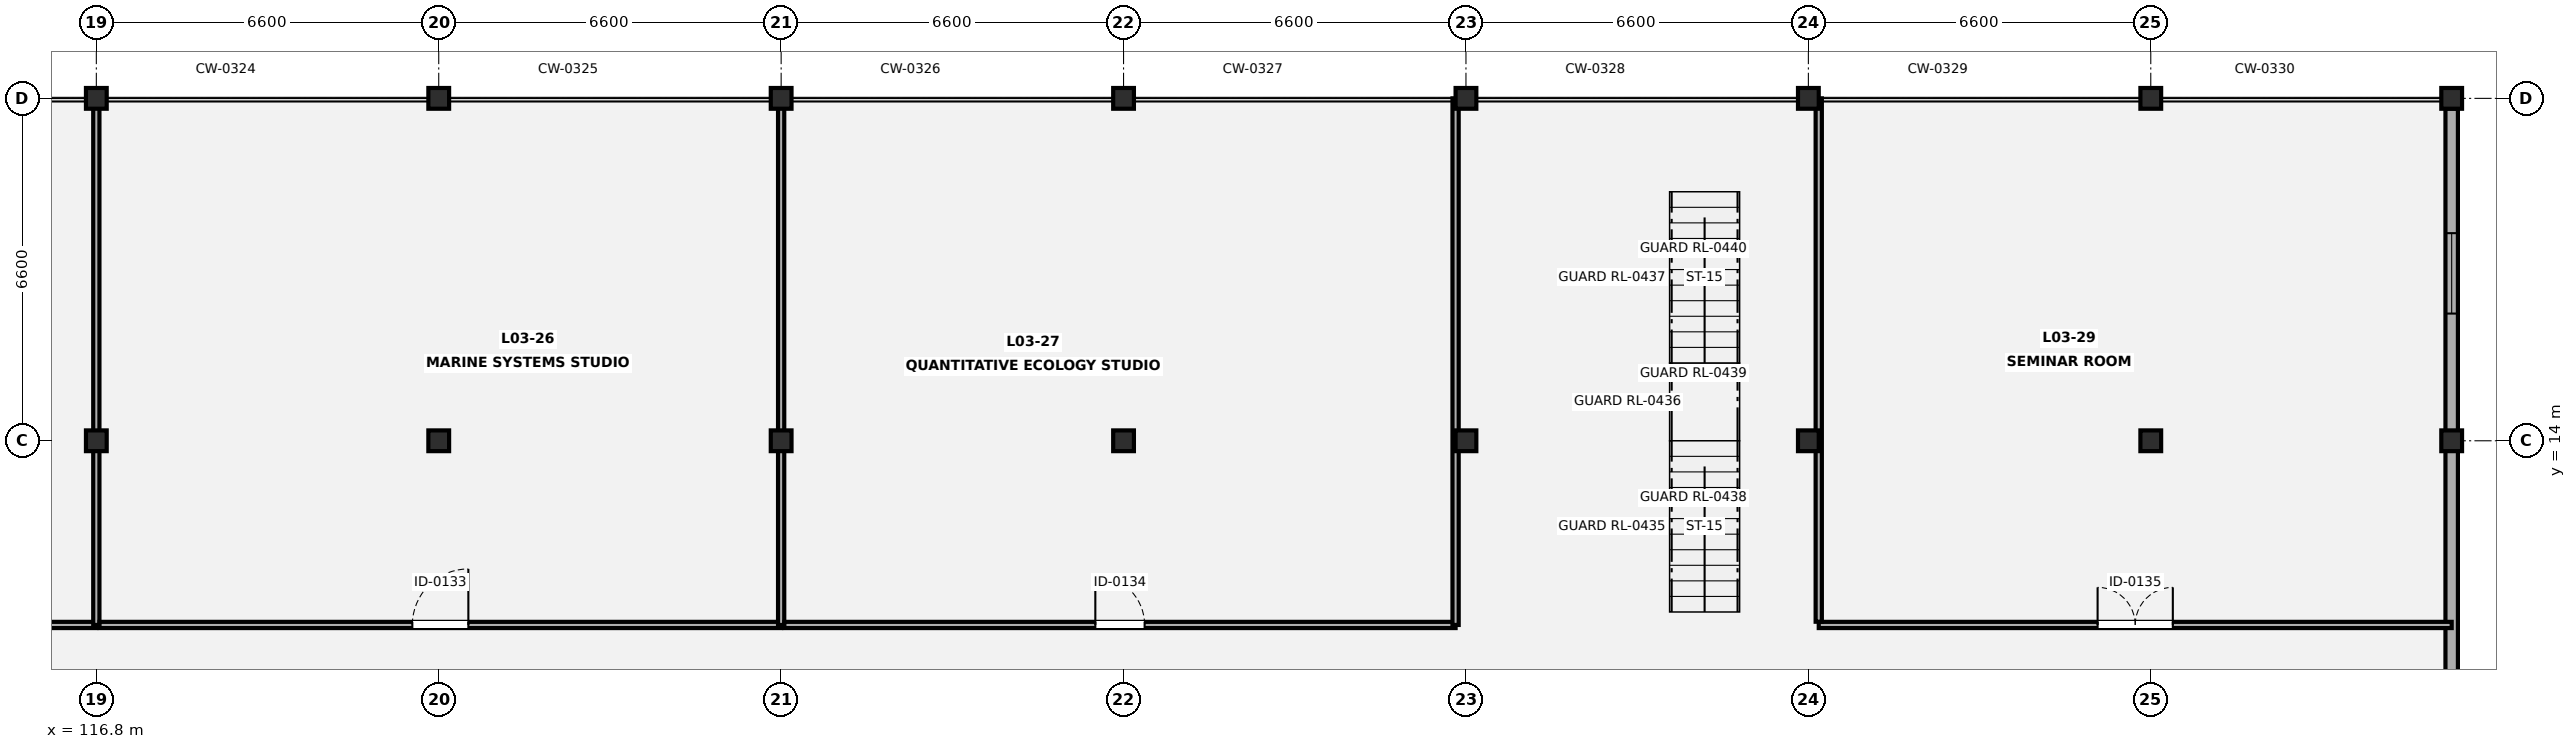
"""IFC4 building model, lengths in metres.
Left out: names, types, materials, properties, quantities, classifications, styles, units other than length and angle.
Written with IfcOpenShell. Run it as: python <this file> out.ifc"""

import sys

from ifc_helpers import new_model, si_unit, direction, frame, frame_2d, origin, origin_2d, place, context, subcontext, project, spatial, rectangle, i_section, extrude, element, fill, save


model = new_model("IFC4")
c1 = context("Model", 3, precision=1e-05, world=origin(), true_north=direction((0.0, 1.0)))
c2 = subcontext(c1, "Body", "Model", "MODEL_VIEW")
j1 = project(units=[si_unit("LENGTHUNIT", "METRE"), si_unit("PLANEANGLEUNIT", "RADIAN")], contexts=[c1])
p1 = place(None, origin())
s1 = spatial("IfcSite", under=j1, at=p1, CompositionType="ELEMENT")
p2 = place(p1, origin())
s2 = spatial("IfcBuilding", under=s1, at=p2, CompositionType="ELEMENT")
p3 = place(p2, frame((0.0, 0.0, 13.3)))
s3 = spatial("IfcBuildingStorey", under=s2, at=p3, CompositionType="ELEMENT", Elevation=13.3)
for number, where, z_axis, x_axis in (
    (1, (116.8, 14.0, 0.0), (0.0, 0.0, 1.0), (1.0, 0.0, 0.0)),
    (2, (116.8, 20.6, 0.0), (0.0, 0.0, 1.0), (1.0, 0.0, 0.0)),
    (3, (123.4, 14.0, 0.0), (0.0, 0.0, 1.0), (1.0, 0.0, 0.0)),
    (4, (123.4, 20.6, 0.0), (0.0, 0.0, 1.0), (1.0, 0.0, 0.0)),
    (5, (130.0, 14.0, 0.0), (0.0, 0.0, 1.0), (1.0, 0.0, 0.0)),
    (6, (130.0, 20.6, 0.0), (0.0, 0.0, 1.0), (1.0, 0.0, 0.0)),
    (7, (136.6, 14.0, 0.0), (0.0, 0.0, 1.0), (1.0, 0.0, 0.0)),
    (8, (136.6, 20.6, 0.0), (0.0, 0.0, 1.0), (1.0, 0.0, 0.0)),
    (9, (143.2, 14.0, 0.0), (0.0, 0.0, 1.0), (1.0, 0.0, 0.0)),
    (10, (143.2, 20.6, 0.0), (0.0, 0.0, 1.0), (1.0, 0.0, 0.0)),
    (11, (149.8, 14.0, 0.0), (0.0, 0.0, 1.0), (1.0, 0.0, 0.0)),
    (12, (149.8, 20.6, 0.0), (0.0, 0.0, 1.0), (1.0, 0.0, 0.0)),
    (13, (156.4, 14.0, 0.0), (0.0, 0.0, 1.0), (1.0, 0.0, 0.0)),
    (14, (156.4, 20.6, 0.0), (0.0, 0.0, 1.0), (1.0, 0.0, 0.0)),
    (15, (162.2, 14.0, 0.0), (0.0, 0.0, 1.0), (1.0, 0.0, 0.0)),
    (16, (162.2, 20.6, 0.0), (0.0, 0.0, 1.0), (1.0, 0.0, 0.0)),
):
    element("IfcColumn", number, at=place(p3, frame(where, z_axis=z_axis, x_axis=x_axis)), inside=s3, PredefinedType="COLUMN", context=c2, shape_type="SweptSolid", body=[
        extrude(i_section(OverallWidth=0.4, OverallDepth=0.4, WebThickness=0.02, FlangeThickness=0.035, FilletRadius=0.016, at=origin_2d()), origin(), (0.0, 0.0, 1.0), 4.2),
    ])
p4 = place(p3, frame((162.2, 20.402, 0.0), z_axis=(0.0, 0.0, 1.0), x_axis=(0.0, -1.0, 0.0)))
e17 = element("IfcWall", 17, at=p4, inside=s3, PredefinedType="SOLIDWALL", context=c2, shape_type="SweptSolid", body=[
    extrude(rectangle(XDim=19.404, YDim=0.24, at=frame_2d((9.702, 0.0))), origin(), (0.0, 0.0, 1.0), 3.372),
])
p5 = place(p4, frame((2.4, 0.0, 0.85)))
e18 = element("IfcOpeningElement", 18, at=p5, cuts=e17, PredefinedType="OPENING", context=c2, shape_type="SweptSolid", body=[
    extrude(rectangle(XDim=1.55, YDim=1.4, at=frame_2d((0.775, 0.7))), frame((0.0, 0.13, 0.0), z_axis=(0.0, -1.0, 0.0), x_axis=(1.0, 0.0, 0.0)), (0.0, 0.0, 1.0), 0.26),
])
p6 = place(p4, frame((15.1, 0.0, 0.85)))
e19 = element("IfcOpeningElement", 19, at=p6, cuts=e17, PredefinedType="OPENING", context=c2, shape_type="SweptSolid", body=[
    extrude(rectangle(XDim=1.95, YDim=1.5, at=frame_2d((0.975, 0.75))), frame((0.0, 0.13, 0.0), z_axis=(0.0, -1.0, 0.0), x_axis=(1.0, 0.0, 0.0)), (0.0, 0.0, 1.0), 0.26),
])
p7 = place(p3, frame((103.6, 10.45, 0.0), z_axis=(0.0, 0.0, 1.0), x_axis=(1.0, 0.0, 0.0)))
e20 = element("IfcWall", 20, at=p7, inside=s3, PredefinedType="PARTITIONING", context=c2, shape_type="SweptSolid", body=[
    extrude(rectangle(XDim=13.2, YDim=0.12, at=frame_2d((6.6, 0.0))), origin(), (0.0, 0.0, 1.0), 3.546),
])
p8 = place(p7, frame((6.125, 0.0, 0.0)))
e21 = element("IfcOpeningElement", 21, at=p8, cuts=e20, PredefinedType="OPENING", context=c2, shape_type="SweptSolid", body=[
    extrude(rectangle(XDim=0.95, YDim=2.1, at=frame_2d((0.475, 1.05))), frame((0.0, 0.07, 0.0), z_axis=(0.0, -1.0, 0.0), x_axis=(1.0, 0.0, 0.0)), (0.0, 0.0, 1.0), 0.14),
])
p9 = place(p3, frame((116.8, 10.45, 0.0), z_axis=(0.0, 0.0, 1.0), x_axis=(0.0, 1.0, 0.0)))
e22 = element("IfcWall", 22, at=p9, inside=s3, PredefinedType="PARTITIONING", context=c2, shape_type="SweptSolid", body=[
    extrude(rectangle(XDim=10.15, YDim=0.12, at=frame_2d((5.075, 0.0))), origin(), (0.0, 0.0, 1.0), 3.372),
])
p10 = place(p3, frame((116.862, 10.45, 0.0), z_axis=(0.0, 0.0, 1.0), x_axis=(1.0, 0.0, 0.0)))
e23 = element("IfcWall", 23, at=p10, inside=s3, PredefinedType="PARTITIONING", context=c2, shape_type="SweptSolid", body=[
    extrude(rectangle(XDim=13.138, YDim=0.12, at=frame_2d((6.569, 0.0))), origin(), (0.0, 0.0, 1.0), 3.546),
])
p11 = place(p10, frame((6.029, 0.0, 0.0)))
e24 = element("IfcOpeningElement", 24, at=p11, cuts=e23, PredefinedType="OPENING", context=c2, shape_type="SweptSolid", body=[
    extrude(rectangle(XDim=1.08, YDim=2.12, at=frame_2d((0.54, 1.06))), frame((0.0, 0.07, 0.0), z_axis=(0.0, -1.0, 0.0), x_axis=(1.0, 0.0, 0.0)), (0.0, 0.0, 1.0), 0.14),
])
p12 = place(p3, frame((130.0, 10.45, 0.0), z_axis=(0.0, 0.0, 1.0), x_axis=(0.0, 1.0, 0.0)))
e25 = element("IfcWall", 25, at=p12, inside=s3, PredefinedType="PARTITIONING", context=c2, shape_type="SweptSolid", body=[
    extrude(rectangle(XDim=10.15, YDim=0.12, at=frame_2d((5.075, 0.0))), origin(), (0.0, 0.0, 1.0), 3.372),
])
p13 = place(p3, frame((130.062, 10.45, 0.0), z_axis=(0.0, 0.0, 1.0), x_axis=(1.0, 0.0, 0.0)))
e26 = element("IfcWall", 26, at=p13, inside=s3, PredefinedType="PARTITIONING", context=c2, shape_type="SweptSolid", body=[
    extrude(rectangle(XDim=12.938, YDim=0.12, at=frame_2d((6.469, 0.0))), origin(), (0.0, 0.0, 1.0), 3.546),
])
p14 = place(p13, frame((5.994, 0.0, 0.0)))
e27 = element("IfcOpeningElement", 27, at=p14, cuts=e26, PredefinedType="OPENING", context=c2, shape_type="SweptSolid", body=[
    extrude(rectangle(XDim=0.95, YDim=2.1, at=frame_2d((0.475, 1.05))), frame((0.0, 0.07, 0.0), z_axis=(0.0, -1.0, 0.0), x_axis=(1.0, 0.0, 0.0)), (0.0, 0.0, 1.0), 0.14),
])
p15 = place(p3, frame((143.0, 10.45, 0.0), z_axis=(0.0, 0.0, 1.0), x_axis=(0.0, 1.0, 0.0)))
e28 = element("IfcWall", 28, at=p15, inside=s3, PredefinedType="PARTITIONING", context=c2, shape_type="SweptSolid", body=[
    extrude(rectangle(XDim=10.15, YDim=0.12, at=frame_2d((5.075, 0.0))), origin(), (0.0, 0.0, 1.0), 3.372),
])
p16 = place(p3, frame((150.0, 10.45, 0.0), z_axis=(0.0, 0.0, 1.0), x_axis=(1.0, 0.0, 0.0)))
e29 = element("IfcWall", 29, at=p16, inside=s3, PredefinedType="PARTITIONING", context=c2, shape_type="SweptSolid", body=[
    extrude(rectangle(XDim=12.2, YDim=0.12, at=frame_2d((6.1, 0.0))), origin(), (0.0, 0.0, 1.0), 3.546),
])
p17 = place(p16, frame((5.375, 0.0, 0.0)))
e30 = element("IfcOpeningElement", 30, at=p17, cuts=e29, PredefinedType="OPENING", context=c2, shape_type="SweptSolid", body=[
    extrude(rectangle(XDim=1.45, YDim=2.12, at=frame_2d((0.725, 1.06))), frame((0.0, 0.07, 0.0), z_axis=(0.0, -1.0, 0.0), x_axis=(1.0, 0.0, 0.0)), (0.0, 0.0, 1.0), 0.14),
])
p18 = place(p3, frame((150.0, 10.512, 0.0), z_axis=(0.0, 0.0, 1.0), x_axis=(0.0, 1.0, 0.0)))
e31 = element("IfcWall", 31, at=p18, inside=s3, PredefinedType="PARTITIONING", context=c2, shape_type="SweptSolid", body=[
    extrude(rectangle(XDim=10.088, YDim=0.12, at=frame_2d((5.044, 0.0))), origin(), (0.0, 0.0, 1.0), 3.372),
])
p19 = place(p5, origin())
e32 = element("IfcWindow", 32, at=p19, inside=s3, PartitioningType="SINGLE_PANEL", PredefinedType="WINDOW", context=c2, shape_type="SweptSolid", body=[
    extrude(rectangle(XDim=1.55, YDim=1.4, at=frame_2d((0.775, 0.7))), frame((0.0, 0.03, 0.0), z_axis=(0.0, -1.0, 0.0), x_axis=(1.0, 0.0, 0.0)), (0.0, 0.0, 1.0), 0.06),
])
fill(e18, e32)
p20 = place(p11, origin())
e33 = element("IfcDoor", 33, at=p20, inside=s3, OperationType="SINGLE_SWING_RIGHT", PredefinedType="DOOR", context=c2, shape_type="SweptSolid", body=[
    extrude(rectangle(XDim=1.08, YDim=2.12, at=frame_2d((0.54, 1.06))), frame((0.0, 0.025, 0.0), z_axis=(0.0, -1.0, 0.0), x_axis=(1.0, 0.0, 0.0)), (0.0, 0.0, 1.0), 0.05),
])
fill(e24, e33)
p21 = place(p14, origin())
e34 = element("IfcDoor", 34, at=p21, inside=s3, OperationType="SINGLE_SWING_LEFT", PredefinedType="DOOR", context=c2, shape_type="SweptSolid", body=[
    extrude(rectangle(XDim=0.95, YDim=2.1, at=frame_2d((0.475, 1.05))), frame((0.0, 0.025, 0.0), z_axis=(0.0, -1.0, 0.0), x_axis=(1.0, 0.0, 0.0)), (0.0, 0.0, 1.0), 0.05),
])
fill(e27, e34)
p22 = place(p17, origin())
e35 = element("IfcDoor", 35, at=p22, inside=s3, OperationType="DOUBLE_DOOR_SINGLE_SWING", PredefinedType="DOOR", context=c2, shape_type="SweptSolid", body=[
    extrude(rectangle(XDim=1.45, YDim=2.12, at=frame_2d((0.725, 1.06))), frame((0.0, 0.025, 0.0), z_axis=(0.0, -1.0, 0.0), x_axis=(1.0, 0.0, 0.0)), (0.0, 0.0, 1.0), 0.05),
])
fill(e30, e35)
save(model, sys.argv[1])
